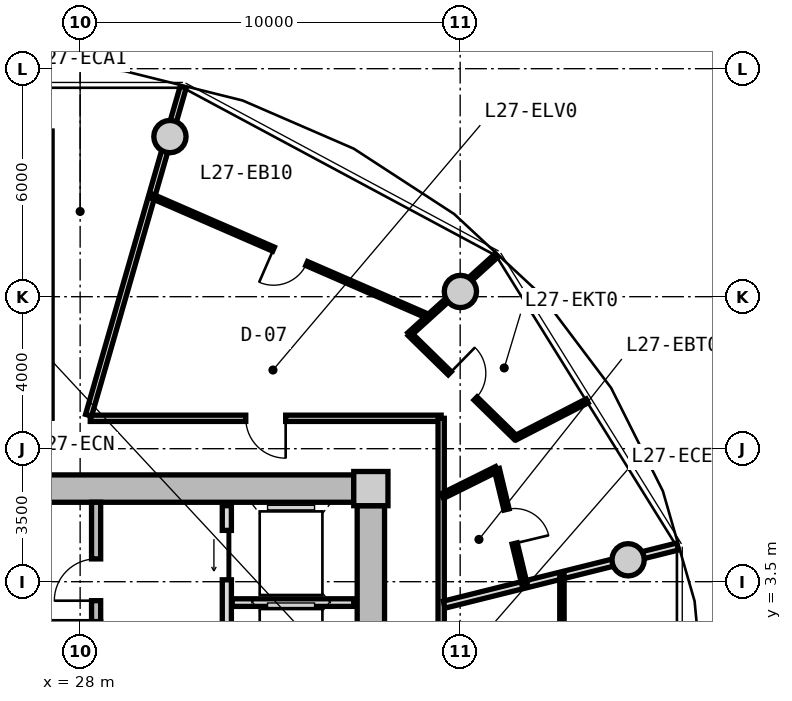
"""IFC4 building model, lengths in metres.
Left out: names, types, materials, properties, quantities, classifications, styles, units other than length and angle.
Written with IfcOpenShell. Run it as: python <this file> out.ifc"""

import sys

from ifc_helpers import new_model, si_unit, direction, frame, frame_2d, origin, origin_2d, place, context, subcontext, project, spatial, rectangle, circle, extrude, source, transform, mapped, element, fill, save


model = new_model("IFC4")
c1 = context("Model", 3, precision=1e-05, world=origin(), true_north=direction((0.0, 1.0)))
c2 = subcontext(c1, "Body", "Model", "MODEL_VIEW")
j1 = project(units=[si_unit("LENGTHUNIT", "METRE"), si_unit("PLANEANGLEUNIT", "RADIAN")], contexts=[c1])
p1 = place(None, origin())
s1 = spatial("IfcSite", under=j1, at=p1, CompositionType="ELEMENT")
p2 = place(p1, origin())
s2 = spatial("IfcBuilding", under=s1, at=p2, CompositionType="ELEMENT")
p3 = place(p2, frame((0.0, 0.0, 90.15)))
s3 = spatial("IfcBuildingStorey", under=s2, at=p3, CompositionType="ELEMENT", Elevation=90.15)
m1 = source(origin(), c2, "Body", "SweptSolid", [
    extrude(rectangle(XDim=0.9, YDim=0.9, at=origin_2d()), origin(), (0.0, 0.0, 1.0), 3.05),
])
p4 = place(p3, frame((35.65, 5.95, 0.0), z_axis=(0.0, 0.0, 1.0), x_axis=(1.0, 0.0, 0.0)))
e1 = element("IfcColumn", 1, at=p4, inside=s3, PredefinedType="COLUMN", context=c2, shape_type="MappedRepresentation", body=[
    mapped(m1, transform((0.0, 0.0, 0.0), x_axis=(1.0, 0.0, 0.0), y_axis=(0.0, 1.0, 0.0), z_axis=(0.0, 0.0, 1.0), scale=1.0)),
])
m2 = source(origin(), c2, "Body", "SweptSolid", [
    extrude(rectangle(XDim=14.4, YDim=0.72, at=frame_2d((7.2, 0.0))), origin(), (0.0, 0.0, 1.0), 2.79),
])
p5 = place(p3, frame((20.8, 5.95, 0.0), z_axis=(0.0, 0.0, 1.0), x_axis=(1.0, 0.0, 0.0)))
e2 = element("IfcWall", 2, at=p5, inside=s3, PredefinedType="SHEAR", context=c2, shape_type="MappedRepresentation", body=[
    mapped(m2, transform((0.0, 0.0, 0.0), x_axis=(1.0, 0.0, 0.0), y_axis=(0.0, 1.0, 0.0), z_axis=(0.0, 0.0, 1.0), scale=1.0)),
])
m3 = source(origin(), c2, "Body", "SweptSolid", [
    extrude(rectangle(XDim=11.0, YDim=0.72, at=frame_2d((5.5, 0.0))), origin(), (0.0, 0.0, 1.0), 2.79),
])
p6 = place(p3, frame((35.65, 5.5, 0.0), z_axis=(0.0, 0.0, 1.0), x_axis=(0.0, -1.0, 0.0)))
e3 = element("IfcWall", 3, at=p6, inside=s3, PredefinedType="SHEAR", context=c2, shape_type="MappedRepresentation", body=[
    mapped(m3, transform((0.0, 0.0, 0.0), x_axis=(1.0, 0.0, 0.0), y_axis=(0.0, 1.0, 0.0), z_axis=(0.0, 0.0, 1.0), scale=1.0)),
])
p7 = place(p6, frame((5.65, 0.0, 0.0)))
e4 = element("IfcOpeningElement", 4, at=p7, cuts=e3, PredefinedType="OPENING", context=c2, shape_type="SweptSolid", body=[
    extrude(rectangle(XDim=1.2, YDim=2.15, at=frame_2d((0.6, 1.075))), frame((0.0, 0.37, 0.0), z_axis=(0.0, -1.0, 0.0), x_axis=(1.0, 0.0, 0.0)), (0.0, 0.0, 1.0), 0.74),
])
m4 = source(origin(), c2, "Body", "SweptSolid", [
    extrude(circle(Radius=0.425, at=origin_2d()), origin(), (0.0, 0.0, 1.0), 3.05),
])
for number, where, z_axis, x_axis in (
    (5, (42.419, 4.076, 0.0), (0.0, 0.0, 1.0), (1.0, 0.0, 0.0)),
    (6, (38.006, 11.137, 0.0), (0.0, 0.0, 1.0), (1.0, 0.0, 0.0)),
    (7, (30.363, 15.213, 0.0), (0.0, 0.0, 1.0), (1.0, 0.0, 0.0)),
):
    element("IfcColumn", number, at=place(p3, frame(where, z_axis=z_axis, x_axis=x_axis)), inside=s3, PredefinedType="COLUMN", context=c2, shape_type="MappedRepresentation", body=[
        mapped(m4, transform((0.0, 0.0, 0.0), x_axis=(1.0, 0.0, 0.0), y_axis=(0.0, 1.0, 0.0), z_axis=(0.0, 0.0, 1.0), scale=1.0)),
    ])
m5 = source(origin(), c2, "Body", "SweptSolid", [
    extrude(rectangle(XDim=3.14, YDim=0.24, at=frame_2d((1.57, 0.0))), origin(), (0.0, 0.0, 1.0), 2.79),
])
p8 = place(p3, frame((28.42, 2.45, 0.0), z_axis=(0.0, 0.0, 1.0), x_axis=(0.0, 1.0, 0.0)))
e8 = element("IfcWall", 8, at=p8, inside=s3, PredefinedType="PARTITIONING", context=c2, shape_type="MappedRepresentation", body=[
    mapped(m5, transform((0.0, 0.0, 0.0), x_axis=(1.0, 0.0, 0.0), y_axis=(0.0, 1.0, 0.0), z_axis=(0.0, 0.0, 1.0), scale=1.0)),
])
p9 = place(p8, frame((0.55, 0.0, 0.0)))
e9 = element("IfcOpeningElement", 9, at=p9, cuts=e8, PredefinedType="OPENING", context=c2, shape_type="SweptSolid", body=[
    extrude(rectangle(XDim=1.1, YDim=2.15, at=frame_2d((0.55, 1.075))), frame((0.0, 0.13, 0.0), z_axis=(0.0, -1.0, 0.0), x_axis=(1.0, 0.0, 0.0)), (0.0, 0.0, 1.0), 0.26),
])
m6 = source(origin(), c2, "Body", "SweptSolid", [
    extrude(rectangle(XDim=5.0, YDim=0.24, at=frame_2d((2.5, 0.0))), origin(), (0.0, 0.0, 1.0), 2.775),
])
p10 = place(p3, frame((31.86, 0.5, 0.0), z_axis=(0.0, 0.0, 1.0), x_axis=(0.0, 1.0, 0.0)))
e10 = element("IfcWall", 10, at=p10, inside=s3, PredefinedType="PARTITIONING", context=c2, shape_type="MappedRepresentation", body=[
    mapped(m6, transform((0.0, 0.0, 0.0), x_axis=(1.0, 0.0, 0.0), y_axis=(0.0, 1.0, 0.0), z_axis=(0.0, 0.0, 1.0), scale=1.0)),
])
p11 = place(p10, frame((3.05, 0.0, 0.0)))
e11 = element("IfcOpeningElement", 11, at=p11, cuts=e10, PredefinedType="OPENING", context=c2, shape_type="SweptSolid", body=[
    extrude(rectangle(XDim=1.3, YDim=2.2, at=frame_2d((0.65, 1.1))), frame((0.0, 0.13, 0.0), z_axis=(0.0, -1.0, 0.0), x_axis=(1.0, 0.0, 0.0)), (0.0, 0.0, 1.0), 0.26),
])
p12 = place(p10, frame((0.55, 0.0, 0.0)))
e12 = element("IfcOpeningElement", 12, at=p12, cuts=e10, PredefinedType="OPENING", context=c2, shape_type="SweptSolid", body=[
    extrude(rectangle(XDim=1.3, YDim=2.2, at=frame_2d((0.65, 1.1))), frame((0.0, 0.13, 0.0), z_axis=(0.0, -1.0, 0.0), x_axis=(1.0, 0.0, 0.0)), (0.0, 0.0, 1.0), 0.26),
])
m7 = source(origin(), c2, "Body", "SweptSolid", [
    extrude(rectangle(XDim=3.2, YDim=0.2, at=frame_2d((1.6, 0.0))), origin(), (0.0, 0.0, 1.0), 2.775),
])
p13 = place(p3, frame((32.0, 2.95, 0.0), z_axis=(0.0, 0.0, 1.0), x_axis=(1.0, 0.0, 0.0)))
e13 = element("IfcWall", 13, at=p13, inside=s3, PredefinedType="PARTITIONING", context=c2, shape_type="MappedRepresentation", body=[
    mapped(m7, transform((0.0, 0.0, 0.0), x_axis=(1.0, 0.0, 0.0), y_axis=(0.0, 1.0, 0.0), z_axis=(0.0, 0.0, 1.0), scale=1.0)),
])
m8 = source(origin(), c2, "Body", "SweptSolid", [
    extrude(rectangle(XDim=9.234, YDim=0.165, at=frame_2d((4.617, 0.0))), origin(), (0.0, 0.0, 1.0), 2.775),
])
p14 = place(p3, frame((28.266, 7.8, 0.0), z_axis=(0.0, 0.0, 1.0), x_axis=(1.0, 0.0, 0.0)))
e14 = element("IfcWall", 14, at=p14, inside=s3, PredefinedType="PARTITIONING", context=c2, shape_type="MappedRepresentation", body=[
    mapped(m8, transform((0.0, 0.0, 0.0), x_axis=(1.0, 0.0, 0.0), y_axis=(0.0, 1.0, 0.0), z_axis=(0.0, 0.0, 1.0), scale=1.0)),
])
p15 = place(p14, frame((4.092, 0.0, 0.0)))
e15 = element("IfcOpeningElement", 15, at=p15, cuts=e14, PredefinedType="OPENING", context=c2, shape_type="SweptSolid", body=[
    extrude(rectangle(XDim=1.05, YDim=2.15, at=frame_2d((0.525, 1.075))), frame((0.0, 0.093, 0.0), z_axis=(0.0, -1.0, 0.0), x_axis=(1.0, 0.0, 0.0)), (0.0, 0.0, 1.0), 0.185),
])
m9 = source(origin(), c2, "Body", "SweptSolid", [
    extrude(rectangle(XDim=15.6, YDim=0.165, at=frame_2d((7.8, 0.0))), origin(), (0.0, 0.0, 1.0), 2.775),
])
p16 = place(p3, frame((37.5, 7.8, 0.0), z_axis=(0.0, 0.0, 1.0), x_axis=(0.0, -1.0, 0.0)))
e16 = element("IfcWall", 16, at=p16, inside=s3, PredefinedType="PARTITIONING", context=c2, shape_type="MappedRepresentation", body=[
    mapped(m9, transform((0.0, 0.0, 0.0), x_axis=(1.0, 0.0, 0.0), y_axis=(0.0, 1.0, 0.0), z_axis=(0.0, 0.0, 1.0), scale=1.0)),
])
p17 = place(p16, frame((9.177, 0.0, 0.0)))
e17 = element("IfcOpeningElement", 17, at=p17, cuts=e16, PredefinedType="OPENING", context=c2, shape_type="SweptSolid", body=[
    extrude(rectangle(XDim=1.05, YDim=2.15, at=frame_2d((0.525, 1.075))), frame((0.0, 0.093, 0.0), z_axis=(0.0, -1.0, 0.0), x_axis=(1.0, 0.0, 0.0)), (0.0, 0.0, 1.0), 0.185),
])
m10 = source(origin(), c2, "Body", "SweptSolid", [
    extrude(rectangle(XDim=8.989, YDim=0.165, at=frame_2d((4.495, 0.0))), origin(), (0.0, 0.0, 1.0), 2.275),
])
p18 = place(p3, frame((28.222, 7.88, 0.0), z_axis=(0.0, 0.0, 1.0), x_axis=(0.27702323008, 0.960863221274, 0.0)))
e18 = element("IfcWall", 18, at=p18, inside=s3, PredefinedType="PARTITIONING", context=c2, shape_type="MappedRepresentation", body=[
    mapped(m10, transform((0.0, 0.0, 0.0), x_axis=(1.0, 0.0, 0.0), y_axis=(0.0, 1.0, 0.0), z_axis=(0.0, 0.0, 1.0), scale=1.0)),
])
m11 = source(origin(), c2, "Body", "SweptSolid", [
    extrude(rectangle(XDim=6.331, YDim=0.19, at=frame_2d((3.165, 0.0))), origin(), (0.0, 0.0, 1.0), 2.275),
])
p19 = place(p3, frame((37.58, 2.896, 0.0), z_axis=(0.0, 0.0, 1.0), x_axis=(0.97036440661, 0.241646267062, 0.0)))
e19 = element("IfcWall", 19, at=p19, inside=s3, PredefinedType="PARTITIONING", context=c2, shape_type="MappedRepresentation", body=[
    mapped(m11, transform((0.0, 0.0, 0.0), x_axis=(1.0, 0.0, 0.0), y_axis=(0.0, 1.0, 0.0), z_axis=(0.0, 0.0, 1.0), scale=1.0)),
])
m12 = source(origin(), c2, "Body", "SweptSolid", [
    extrude(rectangle(XDim=7.375, YDim=0.115, at=frame_2d((3.688, 0.0))), origin(), (0.0, 0.0, 1.0), 2.775),
])
p20 = place(p3, frame((40.678, -3.688, 0.0), z_axis=(0.0, 0.0, 1.0), x_axis=(0.0, 1.0, 0.0)))
e20 = element("IfcWall", 20, at=p20, inside=s3, PredefinedType="PARTITIONING", context=c2, shape_type="MappedRepresentation", body=[
    mapped(m12, transform((0.0, 0.0, 0.0), x_axis=(1.0, 0.0, 0.0), y_axis=(0.0, 1.0, 0.0), z_axis=(0.0, 0.0, 1.0), scale=1.0)),
])
p21 = place(p20, frame((3.213, 0.0, 0.0)))
e21 = element("IfcOpeningElement", 21, at=p21, cuts=e20, PredefinedType="OPENING", context=c2, shape_type="SweptSolid", body=[
    extrude(rectangle(XDim=0.95, YDim=2.1, at=frame_2d((0.475, 1.05))), frame((0.0, 0.067, 0.0), z_axis=(0.0, -1.0, 0.0), x_axis=(1.0, 0.0, 0.0)), (0.0, 0.0, 1.0), 0.135),
])
m13 = source(origin(), c2, "Body", "SweptSolid", [
    extrude(rectangle(XDim=7.938, YDim=0.115, at=frame_2d((3.969, 0.0))), origin(), (0.0, 0.0, 1.0), 2.775),
])
p22 = place(p3, frame((37.164, 10.479, 0.0), z_axis=(0.0, 0.0, 1.0), x_axis=(-0.917052940979, 0.398765474235, 0.0)))
e22 = element("IfcWall", 22, at=p22, inside=s3, PredefinedType="PARTITIONING", context=c2, shape_type="MappedRepresentation", body=[
    mapped(m13, transform((0.0, 0.0, 0.0), x_axis=(1.0, 0.0, 0.0), y_axis=(0.0, 1.0, 0.0), z_axis=(0.0, 0.0, 1.0), scale=1.0)),
])
p23 = place(p22, frame((3.494, 0.0, 0.0)))
e23 = element("IfcOpeningElement", 23, at=p23, cuts=e22, PredefinedType="OPENING", context=c2, shape_type="SweptSolid", body=[
    extrude(rectangle(XDim=0.95, YDim=2.1, at=frame_2d((0.475, 1.05))), frame((0.0, 0.067, 0.0), z_axis=(0.0, -1.0, 0.0), x_axis=(1.0, 0.0, 0.0)), (0.0, 0.0, 1.0), 0.135),
])
m14 = source(origin(), c2, "Body", "SweptSolid", [
    extrude(rectangle(XDim=3.102, YDim=0.115, at=frame_2d((1.551, 0.0))), origin(), (0.0, 0.0, 1.0), 2.275),
])
p24 = place(p3, frame((36.661, 10.01, 0.0), z_axis=(0.0, 0.0, 1.0), x_axis=(0.741263481794, 0.671214161471, 0.0)))
e24 = element("IfcWall", 24, at=p24, inside=s3, PredefinedType="PARTITIONING", context=c2, shape_type="MappedRepresentation", body=[
    mapped(m14, transform((0.0, 0.0, 0.0), x_axis=(1.0, 0.0, 0.0), y_axis=(0.0, 1.0, 0.0), z_axis=(0.0, 0.0, 1.0), scale=1.0)),
])
m15 = source(origin(), c2, "Body", "SweptSolid", [
    extrude(rectangle(XDim=1.6, YDim=0.14, at=frame_2d((0.8, 0.0))), origin(), (0.0, 0.0, 1.0), 2.775),
])
p25 = place(p3, frame((37.53, 5.754, 0.0), z_axis=(0.0, 0.0, 1.0), x_axis=(0.895522919837, 0.445015393044, 0.0)))
e25 = element("IfcWall", 25, at=p25, inside=s3, PredefinedType="PARTITIONING", context=c2, shape_type="MappedRepresentation", body=[
    mapped(m15, transform((0.0, 0.0, 0.0), x_axis=(1.0, 0.0, 0.0), y_axis=(0.0, 1.0, 0.0), z_axis=(0.0, 0.0, 1.0), scale=1.0)),
])
m16 = source(origin(), c2, "Body", "SweptSolid", [
    extrude(rectangle(XDim=3.112, YDim=0.14, at=frame_2d((1.556, 0.0))), origin(), (0.0, 0.0, 1.0), 2.415),
])
p26 = place(p3, frame((38.963, 6.466, 0.0), z_axis=(0.0, 0.0, 1.0), x_axis=(0.233737944029, -0.972299631555, 0.0)))
e26 = element("IfcWall", 26, at=p26, inside=s3, PredefinedType="PARTITIONING", context=c2, shape_type="MappedRepresentation", body=[
    mapped(m16, transform((0.0, 0.0, 0.0), x_axis=(1.0, 0.0, 0.0), y_axis=(0.0, 1.0, 0.0), z_axis=(0.0, 0.0, 1.0), scale=1.0)),
])
p27 = place(p26, frame((1.096, 0.0, 0.0)))
e27 = element("IfcOpeningElement", 27, at=p27, cuts=e26, PredefinedType="OPENING", context=c2, shape_type="SweptSolid", body=[
    extrude(rectangle(XDim=0.92, YDim=2.1, at=frame_2d((0.46, 1.05))), frame((0.0, 0.08, 0.0), z_axis=(0.0, -1.0, 0.0), x_axis=(1.0, 0.0, 0.0)), (0.0, 0.0, 1.0), 0.16),
])
m17 = source(origin(), c2, "Body", "SweptSolid", [
    extrude(rectangle(XDim=2.117, YDim=0.115, at=frame_2d((1.059, 0.0))), origin(), (0.0, 0.0, 1.0), 2.775),
])
p28 = place(p3, frame((39.46, 7.289, 0.0), z_axis=(0.0, 0.0, 1.0), x_axis=(0.888941834945, 0.45802010227, 0.0)))
e28 = element("IfcWall", 28, at=p28, inside=s3, PredefinedType="PARTITIONING", context=c2, shape_type="MappedRepresentation", body=[
    mapped(m17, transform((0.0, 0.0, 0.0), x_axis=(1.0, 0.0, 0.0), y_axis=(0.0, 1.0, 0.0), z_axis=(0.0, 0.0, 1.0), scale=1.0)),
])
m18 = source(origin(), c2, "Body", "SweptSolid", [
    extrude(rectangle(XDim=3.902, YDim=0.115, at=frame_2d((1.951, 0.0))), origin(), (0.0, 0.0, 1.0), 2.775),
])
p29 = place(p3, frame((39.46, 7.289, 0.0), z_axis=(0.0, 0.0, 1.0), x_axis=(-0.714853061854, 0.699274695637, 0.0)))
e29 = element("IfcWall", 29, at=p29, inside=s3, PredefinedType="PARTITIONING", context=c2, shape_type="MappedRepresentation", body=[
    mapped(m18, transform((0.0, 0.0, 0.0), x_axis=(1.0, 0.0, 0.0), y_axis=(0.0, 1.0, 0.0), z_axis=(0.0, 0.0, 1.0), scale=1.0)),
])
p30 = place(p29, frame((1.476, 0.0, 0.0)))
e30 = element("IfcOpeningElement", 30, at=p30, cuts=e29, PredefinedType="OPENING", context=c2, shape_type="SweptSolid", body=[
    extrude(rectangle(XDim=0.95, YDim=2.1, at=frame_2d((0.475, 1.05))), frame((0.0, 0.067, 0.0), z_axis=(0.0, -1.0, 0.0), x_axis=(1.0, 0.0, 0.0)), (0.0, 0.0, 1.0), 0.135),
])
m19 = source(origin(), c2, "Body", "SweptSolid", [
    extrude(rectangle(XDim=1.1, YDim=2.15, at=frame_2d((0.55, 1.075))), frame((0.0, 0.025, 0.0), z_axis=(0.0, -1.0, 0.0), x_axis=(1.0, 0.0, 0.0)), (0.0, 0.0, 1.0), 0.05),
])
p31 = place(p9, origin())
e31 = element("IfcDoor", 31, at=p31, inside=s3, OperationType="SINGLE_SWING_LEFT", PredefinedType="DOOR", context=c2, shape_type="MappedRepresentation", body=[
    mapped(m19, transform((0.0, 0.0, 0.0), x_axis=(1.0, 0.0, 0.0), y_axis=(0.0, 1.0, 0.0), z_axis=(0.0, 0.0, 1.0), scale=1.0)),
])
fill(e9, e31)
m20 = source(origin(), c2, "Body", "SweptSolid", [
    extrude(rectangle(XDim=1.3, YDim=2.2, at=frame_2d((0.65, 1.1))), frame((0.0, 0.025, 0.0), z_axis=(0.0, -1.0, 0.0), x_axis=(1.0, 0.0, 0.0)), (0.0, 0.0, 1.0), 0.05),
])
p32 = place(p11, origin())
e32 = element("IfcDoor", 32, at=p32, inside=s3, OperationType="SLIDING_TO_LEFT", PredefinedType="DOOR", context=c2, shape_type="MappedRepresentation", body=[
    mapped(m20, transform((0.0, 0.0, 0.0), x_axis=(1.0, 0.0, 0.0), y_axis=(0.0, 1.0, 0.0), z_axis=(0.0, 0.0, 1.0), scale=1.0)),
])
fill(e11, e32)
m21 = source(origin(), c2, "Body", "SweptSolid", [
    extrude(rectangle(XDim=1.05, YDim=2.15, at=frame_2d((0.525, 1.075))), frame((0.0, 0.025, 0.0), z_axis=(0.0, -1.0, 0.0), x_axis=(1.0, 0.0, 0.0)), (0.0, 0.0, 1.0), 0.05),
])
p33 = place(p15, frame((1.05, 0.0, 0.0), z_axis=(0.0, 0.0, 1.0), x_axis=(-1.0, 0.0, 0.0)))
e33 = element("IfcDoor", 33, at=p33, inside=s3, OperationType="SINGLE_SWING_LEFT", PredefinedType="DOOR", context=c2, shape_type="MappedRepresentation", body=[
    mapped(m21, transform((0.0, 0.0, 0.0), x_axis=(1.0, 0.0, 0.0), y_axis=(0.0, 1.0, 0.0), z_axis=(0.0, 0.0, 1.0), scale=1.0)),
])
fill(e15, e33)
m22 = source(origin(), c2, "Body", "SweptSolid", [
    extrude(rectangle(XDim=0.92, YDim=2.1, at=frame_2d((0.46, 1.05))), frame((0.0, 0.025, 0.0), z_axis=(0.0, -1.0, 0.0), x_axis=(1.0, 0.0, 0.0)), (0.0, 0.0, 1.0), 0.05),
])
p34 = place(p27, origin())
e34 = element("IfcDoor", 34, at=p34, inside=s3, OperationType="SINGLE_SWING_RIGHT", PredefinedType="DOOR", context=c2, shape_type="MappedRepresentation", body=[
    mapped(m22, transform((0.0, 0.0, 0.0), x_axis=(1.0, 0.0, 0.0), y_axis=(0.0, 1.0, 0.0), z_axis=(0.0, 0.0, 1.0), scale=1.0)),
])
fill(e27, e34)
m23 = source(origin(), c2, "Body", "SweptSolid", [
    extrude(rectangle(XDim=0.95, YDim=2.1, at=frame_2d((0.475, 1.05))), frame((0.0, 0.025, 0.0), z_axis=(0.0, -1.0, 0.0), x_axis=(1.0, 0.0, 0.0)), (0.0, 0.0, 1.0), 0.05),
])
p35 = place(p30, frame((0.95, 0.0, 0.0), z_axis=(0.0, 0.0, 1.0), x_axis=(-1.0, 0.0, 0.0)))
e35 = element("IfcDoor", 35, at=p35, inside=s3, OperationType="SINGLE_SWING_LEFT", PredefinedType="DOOR", context=c2, shape_type="MappedRepresentation", body=[
    mapped(m23, transform((0.0, 0.0, 0.0), x_axis=(1.0, 0.0, 0.0), y_axis=(0.0, 1.0, 0.0), z_axis=(0.0, 0.0, 1.0), scale=1.0)),
])
fill(e30, e35)
p36 = place(p23, origin())
e36 = element("IfcDoor", 36, at=p36, inside=s3, OperationType="SINGLE_SWING_RIGHT", PredefinedType="DOOR", context=c2, shape_type="MappedRepresentation", body=[
    mapped(m23, transform((0.0, 0.0, 0.0), x_axis=(1.0, 0.0, 0.0), y_axis=(0.0, 1.0, 0.0), z_axis=(0.0, 0.0, 1.0), scale=1.0)),
])
fill(e23, e36)
save(model, sys.argv[1])
